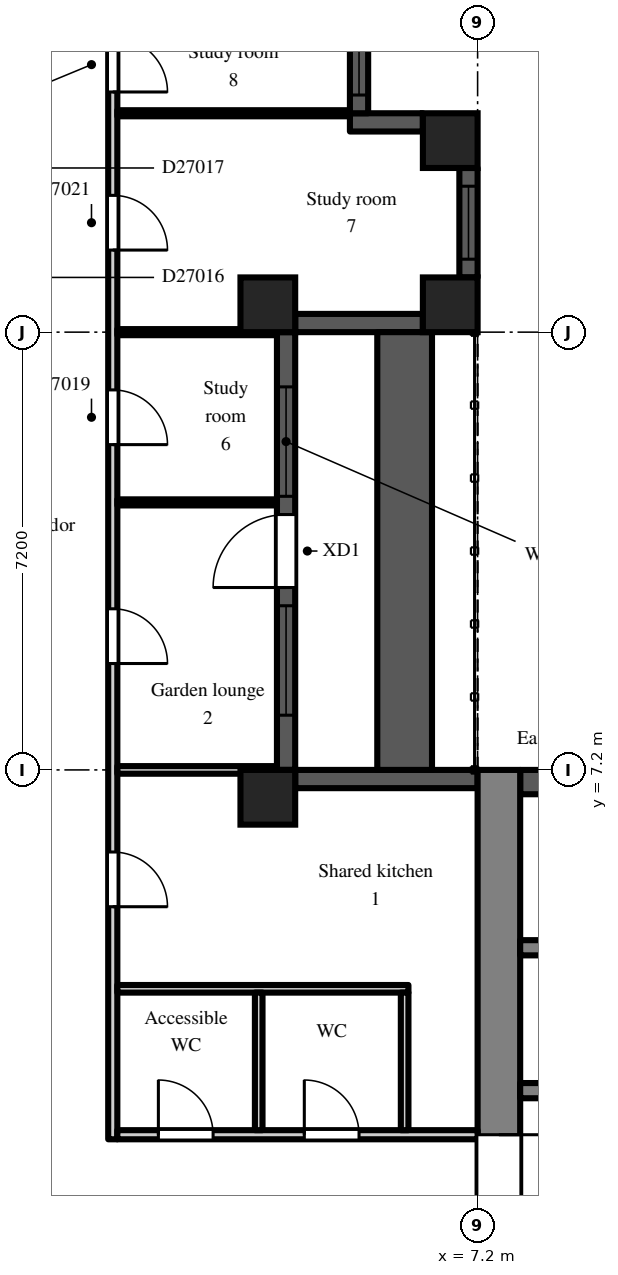
"""IFC4 building model, lengths in metres.
Left out: names, types, materials, properties, quantities, classifications, styles, units other than length and angle.
Written with IfcOpenShell. Run it as: python <this file> out.ifc"""

import sys

from ifc_helpers import new_model, si_unit, direction, frame, frame_2d, origin, origin_2d, place, context, subcontext, project, spatial, rectangle, extrude, element, fill, save


model = new_model("IFC4")
c1 = context("Model", 3, precision=1e-05, world=origin(), true_north=direction((0.0, 1.0)))
c2 = subcontext(c1, "Body", "Model", "MODEL_VIEW")
j1 = project(units=[si_unit("LENGTHUNIT", "METRE"), si_unit("PLANEANGLEUNIT", "RADIAN")], contexts=[c1])
p1 = place(None, origin())
s1 = spatial("IfcSite", under=j1, at=p1, CompositionType="ELEMENT")
p2 = place(p1, origin())
s2 = spatial("IfcBuilding", under=s1, at=p2, CompositionType="ELEMENT")
p3 = place(p2, frame((0.0, 0.0, 188.7)))
s3 = spatial("IfcBuildingStorey", under=s2, at=p3, CompositionType="ELEMENT", Elevation=188.7)
for number, where, z_axis, x_axis in (
    (1, (3.75, 6.75, 0.0), (0.0, 0.0, 1.0), (1.0, 0.0, 0.0)),
    (2, (3.75, 14.85, 0.0), (0.0, 0.0, 1.0), (1.0, 0.0, 0.0)),
    (3, (6.75, 14.85, 0.0), (0.0, 0.0, 1.0), (1.0, 0.0, 0.0)),
    (4, (6.75, 17.55, 0.0), (0.0, 0.0, 1.0), (1.0, 0.0, 0.0)),
):
    element("IfcColumn", number, at=place(p3, frame(where, z_axis=z_axis, x_axis=x_axis)), inside=s3, PredefinedType="COLUMN", context=c2, shape_type="SweptSolid", body=[
        extrude(rectangle(XDim=0.9, YDim=0.9, at=origin_2d()), origin(), (0.0, 0.0, 1.0), 3.0),
    ])
p4 = place(p3, frame((7.2, 7.05, 0.0), z_axis=(0.0, 0.0, 1.0), x_axis=(-1.0, 0.0, 0.0)))
e5 = element("IfcWall", 5, at=p4, inside=s3, PredefinedType="SOLIDWALL", context=c2, shape_type="SweptSolid", body=[
    extrude(rectangle(XDim=3.0, YDim=0.3, at=frame_2d((1.5, 0.0))), origin(), (0.0, 0.0, 1.0), 2.2),
])
p5 = place(p3, frame((4.05, 7.2, 0.0), z_axis=(0.0, 0.0, 1.0), x_axis=(0.0, 1.0, 0.0)))
e6 = element("IfcWall", 6, at=p5, inside=s3, PredefinedType="SOLIDWALL", context=c2, shape_type="SweptSolid", body=[
    extrude(rectangle(XDim=7.2, YDim=0.3, at=frame_2d((3.6, 0.0))), origin(), (0.0, 0.0, 1.0), 2.2),
])
p6 = place(p5, frame((3.0, 0.0, 0.0)))
e7 = element("IfcOpeningElement", 7, at=p6, cuts=e6, PredefinedType="OPENING", context=c2, shape_type="SweptSolid", body=[
    extrude(rectangle(XDim=1.2, YDim=2.05, at=frame_2d((0.6, 1.025))), frame((0.0, 0.16, 0.0), z_axis=(0.0, -1.0, 0.0), x_axis=(1.0, 0.0, 0.0)), (0.0, 0.0, 1.0), 0.32),
])
p7 = place(p5, frame((0.9, 0.0, 0.2)))
e8 = element("IfcOpeningElement", 8, at=p7, cuts=e6, PredefinedType="OPENING", context=c2, shape_type="SweptSolid", body=[
    extrude(rectangle(XDim=1.8, YDim=1.85, at=frame_2d((0.9, 0.925))), frame((0.0, 0.16, 0.0), z_axis=(0.0, -1.0, 0.0), x_axis=(1.0, 0.0, 0.0)), (0.0, 0.0, 1.0), 0.32),
])
p8 = place(p5, frame((4.5, 0.0, 0.2)))
e9 = element("IfcOpeningElement", 9, at=p8, cuts=e6, PredefinedType="OPENING", context=c2, shape_type="SweptSolid", body=[
    extrude(rectangle(XDim=1.8, YDim=1.85, at=frame_2d((0.9, 0.925))), frame((0.0, 0.16, 0.0), z_axis=(0.0, -1.0, 0.0), x_axis=(1.0, 0.0, 0.0)), (0.0, 0.0, 1.0), 0.32),
])
p9 = place(p3, frame((4.2, 14.55, 0.0), z_axis=(0.0, 0.0, 1.0), x_axis=(1.0, 0.0, 0.0)))
e10 = element("IfcWall", 10, at=p9, inside=s3, PredefinedType="SOLIDWALL", context=c2, shape_type="SweptSolid", body=[
    extrude(rectangle(XDim=2.1, YDim=0.3, at=frame_2d((1.05, 0.0))), origin(), (0.0, 0.0, 1.0), 2.2),
])
p10 = place(p3, frame((7.05, 15.3, 0.0), z_axis=(0.0, 0.0, 1.0), x_axis=(0.0, 1.0, 0.0)))
e11 = element("IfcWall", 11, at=p10, inside=s3, PredefinedType="SOLIDWALL", context=c2, shape_type="SweptSolid", body=[
    extrude(rectangle(XDim=1.8, YDim=0.3, at=frame_2d((0.9, 0.0))), origin(), (0.0, 0.0, 1.0), 2.2),
])
p11 = place(p10, frame((0.3, 0.0, 0.2)))
e12 = element("IfcOpeningElement", 12, at=p11, cuts=e11, PredefinedType="OPENING", context=c2, shape_type="SweptSolid", body=[
    extrude(rectangle(XDim=1.2, YDim=1.85, at=frame_2d((0.6, 0.925))), frame((0.0, 0.16, 0.0), z_axis=(0.0, -1.0, 0.0), x_axis=(1.0, 0.0, 0.0)), (0.0, 0.0, 1.0), 0.32),
])
p12 = place(p3, frame((6.3, 17.85, 0.0), z_axis=(0.0, 0.0, 1.0), x_axis=(-1.0, 0.0, 0.0)))
e13 = element("IfcWall", 13, at=p12, inside=s3, PredefinedType="SOLIDWALL", context=c2, shape_type="SweptSolid", body=[
    extrude(rectangle(XDim=1.2, YDim=0.3, at=frame_2d((0.6, 0.0))), origin(), (0.0, 0.0, 1.0), 2.6),
])
p13 = place(p3, frame((5.25, 18.0, 0.0), z_axis=(0.0, 0.0, 1.0), x_axis=(0.0, 1.0, 0.0)))
e14 = element("IfcWall", 14, at=p13, inside=s3, PredefinedType="SOLIDWALL", context=c2, shape_type="SweptSolid", body=[
    extrude(rectangle(XDim=1.8, YDim=0.3, at=frame_2d((0.9, 0.0))), origin(), (0.0, 0.0, 1.0), 2.6),
])
p14 = place(p13, frame((0.3, 0.0, 0.2)))
e15 = element("IfcOpeningElement", 15, at=p14, cuts=e14, PredefinedType="OPENING", context=c2, shape_type="SweptSolid", body=[
    extrude(rectangle(XDim=1.2, YDim=1.85, at=frame_2d((0.6, 0.925))), frame((0.0, 0.16, 0.0), z_axis=(0.0, -1.0, 0.0), x_axis=(1.0, 0.0, 0.0)), (0.0, 0.0, 1.0), 0.32),
])
p15 = place(p3, frame((6.0, 7.2, 0.0), z_axis=(0.0, 0.0, 1.0), x_axis=(0.0, 1.0, 0.0)))
e16 = element("IfcWall", 16, at=p15, inside=s3, PredefinedType="PARAPET", context=c2, shape_type="SweptSolid", body=[
    extrude(rectangle(XDim=7.2, YDim=0.9, at=frame_2d((3.6, 0.0))), origin(), (0.0, 0.0, 1.0), 0.8),
])
p16 = place(p3, frame((7.55, -7.2, 0.0), z_axis=(0.0, 0.0, 1.0), x_axis=(0.0, 1.0, 0.0)))
e17 = element("IfcWall", 17, at=p16, inside=s3, PredefinedType="SHEAR", context=c2, shape_type="SweptSolid", body=[
    extrude(rectangle(XDim=14.4, YDim=0.7, at=frame_2d((7.2, 0.0))), origin(), (0.0, 0.0, 1.0), 2.6),
])
p17 = place(p16, frame((6.0, 0.0, 0.0)))
e18 = element("IfcOpeningElement", 18, at=p17, cuts=e17, PredefinedType="OPENING", context=c2, shape_type="SweptSolid", body=[
    extrude(rectangle(XDim=2.4, YDim=2.2, at=frame_2d((1.2, 1.1))), frame((0.0, 0.36, 0.0), z_axis=(0.0, -1.0, 0.0), x_axis=(1.0, 0.0, 0.0)), (0.0, 0.0, 1.0), 0.72),
])
p18 = place(p3, frame((7.9, 7.0, 0.0), z_axis=(0.0, 0.0, 1.0), x_axis=(1.0, 0.0, 0.0)))
e19 = element("IfcWall", 19, at=p18, inside=s3, PredefinedType="SHEAR", context=c2, shape_type="SweptSolid", body=[
    extrude(rectangle(XDim=12.95, YDim=0.4, at=frame_2d((6.475, 0.0))), origin(), (0.0, 0.0, 1.0), 2.6),
])
p19 = place(p3, frame((7.9, 1.925, 0.0), z_axis=(0.0, 0.0, 1.0), x_axis=(1.0, 0.0, 0.0)))
e20 = element("IfcWall", 20, at=p19, inside=s3, PredefinedType="SHEAR", context=c2, shape_type="SweptSolid", body=[
    extrude(rectangle(XDim=12.95, YDim=0.25, at=frame_2d((6.475, 0.0))), origin(), (0.0, 0.0, 1.0), 2.6),
])
p20 = place(p19, frame((4.825, 0.0, 0.0)))
e21 = element("IfcOpeningElement", 21, at=p20, cuts=e20, PredefinedType="OPENING", context=c2, shape_type="SweptSolid", body=[
    extrude(rectangle(XDim=1.1, YDim=2.1, at=frame_2d((0.55, 1.05))), frame((0.0, 0.135, 0.0), z_axis=(0.0, -1.0, 0.0), x_axis=(1.0, 0.0, 0.0)), (0.0, 0.0, 1.0), 0.27),
])
p21 = place(p19, frame((7.025, 0.0, 0.0)))
e22 = element("IfcOpeningElement", 22, at=p21, cuts=e20, PredefinedType="OPENING", context=c2, shape_type="SweptSolid", body=[
    extrude(rectangle(XDim=1.1, YDim=2.1, at=frame_2d((0.55, 1.05))), frame((0.0, 0.135, 0.0), z_axis=(0.0, -1.0, 0.0), x_axis=(1.0, 0.0, 0.0)), (0.0, 0.0, 1.0), 0.27),
])
p22 = place(p19, frame((9.225, 0.0, 0.0)))
e23 = element("IfcOpeningElement", 23, at=p22, cuts=e20, PredefinedType="OPENING", context=c2, shape_type="SweptSolid", body=[
    extrude(rectangle(XDim=1.1, YDim=2.1, at=frame_2d((0.55, 1.05))), frame((0.0, 0.135, 0.0), z_axis=(0.0, -1.0, 0.0), x_axis=(1.0, 0.0, 0.0)), (0.0, 0.0, 1.0), 0.27),
])
p23 = place(p19, frame((0.525, 0.0, 0.0)))
e24 = element("IfcOpeningElement", 24, at=p23, cuts=e20, PredefinedType="OPENING", context=c2, shape_type="SweptSolid", body=[
    extrude(rectangle(XDim=0.9, YDim=2.1, at=frame_2d((0.45, 1.05))), frame((0.0, 0.135, 0.0), z_axis=(0.0, -1.0, 0.0), x_axis=(1.0, 0.0, 0.0)), (0.0, 0.0, 1.0), 0.27),
])
p24 = place(p19, frame((2.625, 0.0, 0.0)))
e25 = element("IfcOpeningElement", 25, at=p24, cuts=e20, PredefinedType="OPENING", context=c2, shape_type="SweptSolid", body=[
    extrude(rectangle(XDim=1.1, YDim=2.1, at=frame_2d((0.55, 1.05))), frame((0.0, 0.135, 0.0), z_axis=(0.0, -1.0, 0.0), x_axis=(1.0, 0.0, 0.0)), (0.0, 0.0, 1.0), 0.27),
])
p25 = place(p19, frame((11.525, 0.0, 0.0)))
e26 = element("IfcOpeningElement", 26, at=p25, cuts=e20, PredefinedType="OPENING", context=c2, shape_type="SweptSolid", body=[
    extrude(rectangle(XDim=0.9, YDim=2.1, at=frame_2d((0.45, 1.05))), frame((0.0, 0.135, 0.0), z_axis=(0.0, -1.0, 0.0), x_axis=(1.0, 0.0, 0.0)), (0.0, 0.0, 1.0), 0.27),
])
p26 = place(p3, frame((7.9, 4.275, 0.0), z_axis=(0.0, 0.0, 1.0), x_axis=(1.0, 0.0, 0.0)))
e27 = element("IfcWall", 27, at=p26, inside=s3, PredefinedType="SHEAR", context=c2, shape_type="SweptSolid", body=[
    extrude(rectangle(XDim=1.95, YDim=0.25, at=frame_2d((0.975, 0.0))), origin(), (0.0, 0.0, 1.0), 2.6),
])
p27 = place(p3, frame((1.2, 1.125, 0.0), z_axis=(0.0, 0.0, 1.0), x_axis=(0.0, 1.0, 0.0)))
e28 = element("IfcWall", 28, at=p27, inside=s3, PredefinedType="PARTITIONING", context=c2, shape_type="SweptSolid", body=[
    extrude(rectangle(XDim=18.4, YDim=0.15, at=frame_2d((9.2, 0.0))), origin(), (0.0, 0.0, 1.0), 2.6),
])
p28 = place(p27, frame((3.825, 0.0, 0.0)))
e29 = element("IfcOpeningElement", 29, at=p28, cuts=e28, PredefinedType="OPENING", context=c2, shape_type="SweptSolid", body=[
    extrude(rectangle(XDim=0.9, YDim=2.1, at=frame_2d((0.45, 1.05))), frame((0.0, 0.085, 0.0), z_axis=(0.0, -1.0, 0.0), x_axis=(1.0, 0.0, 0.0)), (0.0, 0.0, 1.0), 0.17),
])
p29 = place(p27, frame((11.425, 0.0, 0.0)))
e30 = element("IfcOpeningElement", 30, at=p29, cuts=e28, PredefinedType="OPENING", context=c2, shape_type="SweptSolid", body=[
    extrude(rectangle(XDim=0.9, YDim=2.1, at=frame_2d((0.45, 1.05))), frame((0.0, 0.085, 0.0), z_axis=(0.0, -1.0, 0.0), x_axis=(1.0, 0.0, 0.0)), (0.0, 0.0, 1.0), 0.17),
])
p30 = place(p27, frame((7.825, 0.0, 0.0)))
e31 = element("IfcOpeningElement", 31, at=p30, cuts=e28, PredefinedType="OPENING", context=c2, shape_type="SweptSolid", body=[
    extrude(rectangle(XDim=0.9, YDim=2.1, at=frame_2d((0.45, 1.05))), frame((0.0, 0.085, 0.0), z_axis=(0.0, -1.0, 0.0), x_axis=(1.0, 0.0, 0.0)), (0.0, 0.0, 1.0), 0.17),
])
p31 = place(p27, frame((14.625, 0.0, 0.0)))
e32 = element("IfcOpeningElement", 32, at=p31, cuts=e28, PredefinedType="OPENING", context=c2, shape_type="SweptSolid", body=[
    extrude(rectangle(XDim=0.9, YDim=2.1, at=frame_2d((0.45, 1.05))), frame((0.0, 0.085, 0.0), z_axis=(0.0, -1.0, 0.0), x_axis=(1.0, 0.0, 0.0)), (0.0, 0.0, 1.0), 0.17),
])
p32 = place(p27, frame((17.225, 0.0, 0.0)))
e33 = element("IfcOpeningElement", 33, at=p32, cuts=e28, PredefinedType="OPENING", context=c2, shape_type="SweptSolid", body=[
    extrude(rectangle(XDim=0.9, YDim=2.1, at=frame_2d((0.45, 1.05))), frame((0.0, 0.085, 0.0), z_axis=(0.0, -1.0, 0.0), x_axis=(1.0, 0.0, 0.0)), (0.0, 0.0, 1.0), 0.17),
])
p33 = place(p3, frame((1.275, 1.2, 0.0), z_axis=(0.0, 0.0, 1.0), x_axis=(1.0, 0.0, 0.0)))
e34 = element("IfcWall", 34, at=p33, inside=s3, PredefinedType="PARTITIONING", context=c2, shape_type="SweptSolid", body=[
    extrude(rectangle(XDim=5.925, YDim=0.15, at=frame_2d((2.962, 0.0))), origin(), (0.0, 0.0, 1.0), 2.6),
])
p34 = place(p33, frame((0.675, 0.0, 0.0)))
e35 = element("IfcOpeningElement", 35, at=p34, cuts=e34, PredefinedType="OPENING", context=c2, shape_type="SweptSolid", body=[
    extrude(rectangle(XDim=0.9, YDim=2.1, at=frame_2d((0.45, 1.05))), frame((0.0, 0.085, 0.0), z_axis=(0.0, -1.0, 0.0), x_axis=(1.0, 0.0, 0.0)), (0.0, 0.0, 1.0), 0.17),
])
p35 = place(p33, frame((3.075, 0.0, 0.0)))
e36 = element("IfcOpeningElement", 36, at=p35, cuts=e34, PredefinedType="OPENING", context=c2, shape_type="SweptSolid", body=[
    extrude(rectangle(XDim=0.9, YDim=2.1, at=frame_2d((0.45, 1.05))), frame((0.0, 0.085, 0.0), z_axis=(0.0, -1.0, 0.0), x_axis=(1.0, 0.0, 0.0)), (0.0, 0.0, 1.0), 0.17),
])
p36 = place(p3, frame((1.275, 3.6, 0.0), z_axis=(0.0, 0.0, 1.0), x_axis=(1.0, 0.0, 0.0)))
e37 = element("IfcWall", 37, at=p36, inside=s3, PredefinedType="PARTITIONING", context=c2, shape_type="SweptSolid", body=[
    extrude(rectangle(XDim=4.788, YDim=0.125, at=frame_2d((2.394, 0.0))), origin(), (0.0, 0.0, 1.0), 2.6),
])
p37 = place(p3, frame((1.275, 7.2, 0.0), z_axis=(0.0, 0.0, 1.0), x_axis=(1.0, 0.0, 0.0)))
e38 = element("IfcWall", 38, at=p37, inside=s3, PredefinedType="PARTITIONING", context=c2, shape_type="SweptSolid", body=[
    extrude(rectangle(XDim=2.625, YDim=0.125, at=frame_2d((1.312, 0.0))), origin(), (0.0, 0.0, 1.0), 2.6),
])
for number, where, z_axis, x_axis in (
    (39, (1.275, 11.6, 0.0), (0.0, 0.0, 1.0), (1.0, 0.0, 0.0)),
    (40, (1.275, 14.4, 0.0), (0.0, 0.0, 1.0), (1.0, 0.0, 0.0)),
):
    element("IfcWall", number, at=place(p3, frame(where, z_axis=z_axis, x_axis=x_axis)), inside=s3, PredefinedType="PARTITIONING", context=c2, shape_type="SweptSolid", body=[
        extrude(rectangle(XDim=2.625, YDim=0.1, at=frame_2d((1.312, 0.0))), origin(), (0.0, 0.0, 1.0), 2.6),
    ])
p38 = place(p3, frame((1.275, 18.0, 0.0), z_axis=(0.0, 0.0, 1.0), x_axis=(1.0, 0.0, 0.0)))
e41 = element("IfcWall", 41, at=p38, inside=s3, PredefinedType="PARTITIONING", context=c2, shape_type="SweptSolid", body=[
    extrude(rectangle(XDim=3.825, YDim=0.1, at=frame_2d((1.913, 0.0))), origin(), (0.0, 0.0, 1.0), 2.6),
])
for number, where, z_axis, x_axis in (
    (42, (3.6, 1.275, 0.0), (0.0, 0.0, 1.0), (0.0, 1.0, 0.0)),
    (43, (6.0, 1.275, 0.0), (0.0, 0.0, 1.0), (0.0, 1.0, 0.0)),
):
    element("IfcWall", number, at=place(p3, frame(where, z_axis=z_axis, x_axis=x_axis)), inside=s3, PredefinedType="PARTITIONING", context=c2, shape_type="SweptSolid", body=[
        extrude(rectangle(XDim=2.263, YDim=0.125, at=frame_2d((1.131, 0.0))), origin(), (0.0, 0.0, 1.0), 2.6),
    ])
p39 = place(p6, origin())
e44 = element("IfcDoor", 44, at=p39, inside=s3, OperationType="SINGLE_SWING_LEFT", PredefinedType="DOOR", context=c2, shape_type="SweptSolid", body=[
    extrude(rectangle(XDim=1.2, YDim=2.05, at=frame_2d((0.6, 1.025))), frame((0.0, 0.025, 0.0), z_axis=(0.0, -1.0, 0.0), x_axis=(1.0, 0.0, 0.0)), (0.0, 0.0, 1.0), 0.05),
])
fill(e7, e44)
p40 = place(p7, origin())
e45 = element("IfcWindow", 45, at=p40, inside=s3, PartitioningType="SINGLE_PANEL", PredefinedType="WINDOW", context=c2, shape_type="SweptSolid", body=[
    extrude(rectangle(XDim=1.8, YDim=1.85, at=frame_2d((0.9, 0.925))), frame((0.0, 0.03, 0.0), z_axis=(0.0, -1.0, 0.0), x_axis=(1.0, 0.0, 0.0)), (0.0, 0.0, 1.0), 0.06),
])
fill(e8, e45)
p41 = place(p8, origin())
e46 = element("IfcWindow", 46, at=p41, inside=s3, PartitioningType="SINGLE_PANEL", PredefinedType="WINDOW", context=c2, shape_type="SweptSolid", body=[
    extrude(rectangle(XDim=1.8, YDim=1.85, at=frame_2d((0.9, 0.925))), frame((0.0, 0.03, 0.0), z_axis=(0.0, -1.0, 0.0), x_axis=(1.0, 0.0, 0.0)), (0.0, 0.0, 1.0), 0.06),
])
fill(e9, e46)
p42 = place(p11, origin())
e47 = element("IfcWindow", 47, at=p42, inside=s3, PartitioningType="SINGLE_PANEL", PredefinedType="WINDOW", context=c2, shape_type="SweptSolid", body=[
    extrude(rectangle(XDim=1.2, YDim=1.85, at=frame_2d((0.6, 0.925))), frame((0.0, 0.03, 0.0), z_axis=(0.0, -1.0, 0.0), x_axis=(1.0, 0.0, 0.0)), (0.0, 0.0, 1.0), 0.06),
])
fill(e12, e47)
p43 = place(p14, origin())
e48 = element("IfcWindow", 48, at=p43, inside=s3, PartitioningType="SINGLE_PANEL", PredefinedType="WINDOW", context=c2, shape_type="SweptSolid", body=[
    extrude(rectangle(XDim=1.2, YDim=1.85, at=frame_2d((0.6, 0.925))), frame((0.0, 0.03, 0.0), z_axis=(0.0, -1.0, 0.0), x_axis=(1.0, 0.0, 0.0)), (0.0, 0.0, 1.0), 0.06),
])
fill(e15, e48)
p44 = place(p17, frame((2.4, 0.0, 0.0), z_axis=(0.0, 0.0, 1.0), x_axis=(-1.0, 0.0, 0.0)))
e49 = element("IfcDoor", 49, at=p44, inside=s3, OperationType="DOUBLE_DOOR_DOUBLE_SWING", PredefinedType="DOOR", context=c2, shape_type="SweptSolid", body=[
    extrude(rectangle(XDim=2.4, YDim=2.2, at=frame_2d((1.2, 1.1))), frame((0.0, 0.025, 0.0), z_axis=(0.0, -1.0, 0.0), x_axis=(1.0, 0.0, 0.0)), (0.0, 0.0, 1.0), 0.05),
])
fill(e18, e49)
p45 = place(p34, origin())
e50 = element("IfcDoor", 50, at=p45, inside=s3, OperationType="SINGLE_SWING_LEFT", PredefinedType="DOOR", context=c2, shape_type="SweptSolid", body=[
    extrude(rectangle(XDim=0.9, YDim=2.1, at=frame_2d((0.45, 1.05))), frame((0.0, 0.025, 0.0), z_axis=(0.0, -1.0, 0.0), x_axis=(1.0, 0.0, 0.0)), (0.0, 0.0, 1.0), 0.05),
])
fill(e35, e50)
p46 = place(p35, origin())
e51 = element("IfcDoor", 51, at=p46, inside=s3, OperationType="SINGLE_SWING_LEFT", PredefinedType="DOOR", context=c2, shape_type="SweptSolid", body=[
    extrude(rectangle(XDim=0.9, YDim=2.1, at=frame_2d((0.45, 1.05))), frame((0.0, 0.025, 0.0), z_axis=(0.0, -1.0, 0.0), x_axis=(1.0, 0.0, 0.0)), (0.0, 0.0, 1.0), 0.05),
])
fill(e36, e51)
p47 = place(p28, frame((0.9, 0.0, 0.0), z_axis=(0.0, 0.0, 1.0), x_axis=(-1.0, 0.0, 0.0)))
e52 = element("IfcDoor", 52, at=p47, inside=s3, OperationType="SINGLE_SWING_RIGHT", PredefinedType="DOOR", context=c2, shape_type="SweptSolid", body=[
    extrude(rectangle(XDim=0.9, YDim=2.1, at=frame_2d((0.45, 1.05))), frame((0.0, 0.025, 0.0), z_axis=(0.0, -1.0, 0.0), x_axis=(1.0, 0.0, 0.0)), (0.0, 0.0, 1.0), 0.05),
])
fill(e29, e52)
p48 = place(p29, frame((0.9, 0.0, 0.0), z_axis=(0.0, 0.0, 1.0), x_axis=(-1.0, 0.0, 0.0)))
e53 = element("IfcDoor", 53, at=p48, inside=s3, OperationType="SINGLE_SWING_RIGHT", PredefinedType="DOOR", context=c2, shape_type="SweptSolid", body=[
    extrude(rectangle(XDim=0.9, YDim=2.1, at=frame_2d((0.45, 1.05))), frame((0.0, 0.025, 0.0), z_axis=(0.0, -1.0, 0.0), x_axis=(1.0, 0.0, 0.0)), (0.0, 0.0, 1.0), 0.05),
])
fill(e30, e53)
p49 = place(p30, frame((0.9, 0.0, 0.0), z_axis=(0.0, 0.0, 1.0), x_axis=(-1.0, 0.0, 0.0)))
e54 = element("IfcDoor", 54, at=p49, inside=s3, OperationType="SINGLE_SWING_RIGHT", PredefinedType="DOOR", context=c2, shape_type="SweptSolid", body=[
    extrude(rectangle(XDim=0.9, YDim=2.1, at=frame_2d((0.45, 1.05))), frame((0.0, 0.025, 0.0), z_axis=(0.0, -1.0, 0.0), x_axis=(1.0, 0.0, 0.0)), (0.0, 0.0, 1.0), 0.05),
])
fill(e31, e54)
p50 = place(p31, frame((0.9, 0.0, 0.0), z_axis=(0.0, 0.0, 1.0), x_axis=(-1.0, 0.0, 0.0)))
e55 = element("IfcDoor", 55, at=p50, inside=s3, OperationType="SINGLE_SWING_RIGHT", PredefinedType="DOOR", context=c2, shape_type="SweptSolid", body=[
    extrude(rectangle(XDim=0.9, YDim=2.1, at=frame_2d((0.45, 1.05))), frame((0.0, 0.025, 0.0), z_axis=(0.0, -1.0, 0.0), x_axis=(1.0, 0.0, 0.0)), (0.0, 0.0, 1.0), 0.05),
])
fill(e32, e55)
p51 = place(p32, frame((0.9, 0.0, 0.0), z_axis=(0.0, 0.0, 1.0), x_axis=(-1.0, 0.0, 0.0)))
e56 = element("IfcDoor", 56, at=p51, inside=s3, OperationType="SINGLE_SWING_RIGHT", PredefinedType="DOOR", context=c2, shape_type="SweptSolid", body=[
    extrude(rectangle(XDim=0.9, YDim=2.1, at=frame_2d((0.45, 1.05))), frame((0.0, 0.025, 0.0), z_axis=(0.0, -1.0, 0.0), x_axis=(1.0, 0.0, 0.0)), (0.0, 0.0, 1.0), 0.05),
])
fill(e33, e56)
save(model, sys.argv[1])
